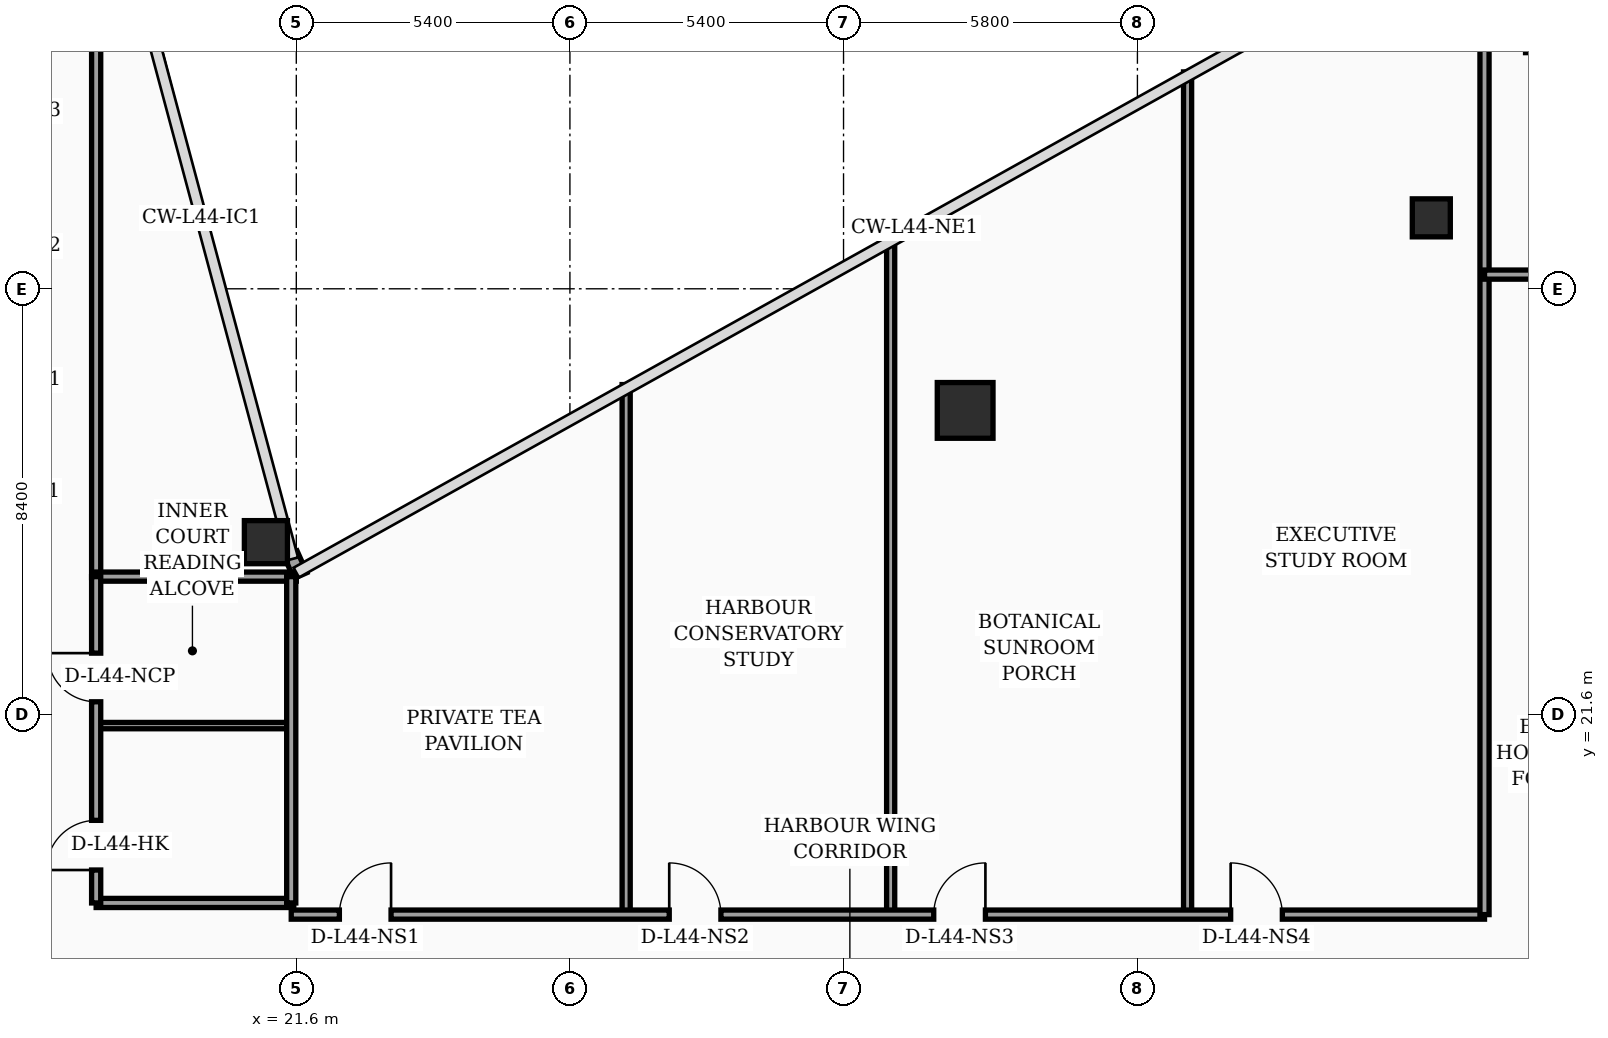
"""IFC4 building model, lengths in metres.
Left out: names, types, materials, properties, quantities, classifications, styles, units other than length and angle.
Written with IfcOpenShell. Run it as: python <this file> out.ifc"""

import sys

from ifc_helpers import new_model, si_unit, direction, frame, frame_2d, origin, origin_2d, place, context, subcontext, project, spatial, rectangle, hollow_rectangle, circle, extrude, element, fill, save


model = new_model("IFC4")
c1 = context("Model", 3, precision=1e-05, world=origin(), true_north=direction((0.0, 1.0)))
c2 = subcontext(c1, "Body", "Model", "MODEL_VIEW")
j1 = project(units=[si_unit("LENGTHUNIT", "METRE"), si_unit("PLANEANGLEUNIT", "RADIAN")], contexts=[c1])
p1 = place(None, origin())
s1 = spatial("IfcSite", under=j1, at=p1, CompositionType="ELEMENT")
p2 = place(p1, origin())
s2 = spatial("IfcBuilding", under=s1, at=p2, CompositionType="ELEMENT")
p3 = place(p2, frame((0.0, 0.0, 178.9)))
s3 = spatial("IfcBuildingStorey", under=s2, at=p3, CompositionType="ELEMENT", Elevation=178.9)
p4 = place(p3, frame((21.0, 25.0, 0.0), z_axis=(0.0, 0.0, 1.0), x_axis=(1.0, 0.0, 0.0)))
e1 = element("IfcColumn", 1, at=p4, inside=s3, PredefinedType="COLUMN", context=c2, shape_type="SweptSolid", body=[
    extrude(hollow_rectangle(XDim=0.85, YDim=0.85, WallThickness=0.036, at=origin_2d()), origin(), (0.0, 0.0, 1.0), 3.56),
])
p5 = place(p3, frame((34.8, 27.6, 0.0), z_axis=(0.0, 0.0, 1.0), x_axis=(1.0, 0.0, 0.0)))
e2 = element("IfcColumn", 2, at=p5, inside=s3, PredefinedType="COLUMN", context=c2, shape_type="SweptSolid", body=[
    extrude(circle(Radius=0.55, at=origin_2d()), origin(), (0.0, 0.0, 1.0), 3.56),
])
p6 = place(p3, frame((44.0, 31.4, 0.0), z_axis=(0.0, 0.0, 1.0), x_axis=(1.0, 0.0, 0.0)))
e3 = element("IfcColumn", 3, at=p6, inside=s3, PredefinedType="COLUMN", context=c2, shape_type="SweptSolid", body=[
    extrude(hollow_rectangle(XDim=0.75, YDim=0.75, WallThickness=0.032, at=origin_2d()), origin(), (0.0, 0.0, 1.0), 3.56),
])
p7 = place(p3, frame((21.68, 24.34, 0.0), z_axis=(0.0, 0.0, 1.0), x_axis=(-0.40758134973, 0.913168901875, 0.0)))
e4 = element("IfcWall", 4, at=p7, inside=s3, PredefinedType="SOLIDWALL", context=c2, shape_type="SweptSolid", body=[
    extrude(rectangle(XDim=0.471, YDim=0.28, at=frame_2d((0.235, 0.0))), origin(), (0.0, 0.0, 1.0), 3.56),
])
p8 = place(p3, frame((50.04, 34.8, 0.0), z_axis=(0.0, 0.0, 1.0), x_axis=(-1.0, 0.0, 0.0)))
e5 = element("IfcWall", 5, at=p8, inside=s3, PredefinedType="SOLIDWALL", context=c2, shape_type="SweptSolid", body=[
    extrude(rectangle(XDim=4.18, YDim=0.28, at=frame_2d((2.09, 0.0))), origin(), (0.0, 0.0, 1.0), 3.56),
])
p9 = place(p3, frame((17.65, 24.3, 0.0), z_axis=(0.0, 0.0, 1.0), x_axis=(0.0, 1.0, 0.0)))
e6 = element("IfcWall", 6, at=p9, inside=s3, PredefinedType="PARTITIONING", context=c2, shape_type="SweptSolid", body=[
    extrude(rectangle(XDim=17.65, YDim=0.18, at=frame_2d((8.825, 0.0))), origin(), (0.0, 0.0, 1.0), 2.94),
])
p10 = place(p3, frame((17.65, 17.88, 0.0), z_axis=(0.0, 0.0, 1.0), x_axis=(1.0, 0.0, 0.0)))
e7 = element("IfcWall", 7, at=p10, inside=s3, PredefinedType="PARTITIONING", context=c2, shape_type="SweptSolid", body=[
    extrude(rectangle(XDim=3.9, YDim=0.18, at=frame_2d((1.95, 0.0))), origin(), (0.0, 0.0, 1.0), 3.56),
])
p11 = place(p3, frame((17.65, 21.38, 0.0), z_axis=(0.0, 0.0, 1.0), x_axis=(1.0, 0.0, 0.0)))
e8 = element("IfcWall", 8, at=p11, inside=s3, PredefinedType="PARTITIONING", context=c2, shape_type="SweptSolid", body=[
    extrude(rectangle(XDim=3.9, YDim=0.125, at=frame_2d((1.95, 0.0))), origin(), (0.0, 0.0, 1.0), 3.09),
])
p12 = place(p3, frame((17.65, 24.32, 0.0), z_axis=(0.0, 0.0, 1.0), x_axis=(1.0, 0.0, 0.0)))
e9 = element("IfcWall", 9, at=p12, inside=s3, PredefinedType="PARTITIONING", context=c2, shape_type="SweptSolid", body=[
    extrude(rectangle(XDim=3.95, YDim=0.18, at=frame_2d((1.975, 0.0))), origin(), (0.0, 0.0, 1.0), 3.56),
])
p13 = place(p3, frame((21.5, 17.88, 0.0), z_axis=(0.0, 0.0, 1.0), x_axis=(0.0, 1.0, 0.0)))
e10 = element("IfcWall", 10, at=p13, inside=s3, PredefinedType="PARTITIONING", context=c2, shape_type="SweptSolid", body=[
    extrude(rectangle(XDim=6.44, YDim=0.18, at=frame_2d((3.22, 0.0))), origin(), (0.0, 0.0, 1.0), 3.09),
])
p14 = place(p3, frame((17.65, 17.88, 0.0), z_axis=(0.0, 0.0, 1.0), x_axis=(0.0, 1.0, 0.0)))
e11 = element("IfcWall", 11, at=p14, inside=s3, PredefinedType="PARTITIONING", context=c2, shape_type="SweptSolid", body=[
    extrude(rectangle(XDim=6.44, YDim=0.18, at=frame_2d((3.22, 0.0))), origin(), (0.0, 0.0, 1.0), 3.09),
])
p15 = place(p14, frame((0.65, 0.0, 0.0)))
e12 = element("IfcOpeningElement", 12, at=p15, cuts=e11, PredefinedType="OPENING", context=c2, shape_type="SweptSolid", body=[
    extrude(rectangle(XDim=0.98, YDim=2.15, at=frame_2d((0.49, 1.075))), frame((0.0, 0.1, 0.0), z_axis=(0.0, -1.0, 0.0), x_axis=(1.0, 0.0, 0.0)), (0.0, 0.0, 1.0), 0.2),
])
p16 = place(p14, frame((3.97, 0.0, 0.0)))
e13 = element("IfcOpeningElement", 13, at=p16, cuts=e11, PredefinedType="OPENING", context=c2, shape_type="SweptSolid", body=[
    extrude(rectangle(XDim=0.96, YDim=2.2, at=frame_2d((0.48, 1.1))), frame((0.0, 0.1, 0.0), z_axis=(0.0, -1.0, 0.0), x_axis=(1.0, 0.0, 0.0)), (0.0, 0.0, 1.0), 0.2),
])
p17 = place(p3, frame((28.11, 17.65, 0.0), z_axis=(0.0, 0.0, 1.0), x_axis=(0.0, 1.0, 0.0)))
e14 = element("IfcWall", 14, at=p17, inside=s3, PredefinedType="PARTITIONING", context=c2, shape_type="SweptSolid", body=[
    extrude(rectangle(XDim=10.46, YDim=0.16, at=frame_2d((5.23, 0.0))), origin(), (0.0, 0.0, 1.0), 2.94),
])
p18 = place(p3, frame((33.33, 17.65, 0.0), z_axis=(0.0, 0.0, 1.0), x_axis=(0.0, 1.0, 0.0)))
e15 = element("IfcWall", 15, at=p18, inside=s3, PredefinedType="PARTITIONING", context=c2, shape_type="SweptSolid", body=[
    extrude(rectangle(XDim=13.37, YDim=0.16, at=frame_2d((6.685, 0.0))), origin(), (0.0, 0.0, 1.0), 2.94),
])
p19 = place(p3, frame((39.19, 17.65, 0.0), z_axis=(0.0, 0.0, 1.0), x_axis=(0.0, 1.0, 0.0)))
e16 = element("IfcWall", 16, at=p19, inside=s3, PredefinedType="PARTITIONING", context=c2, shape_type="SweptSolid", body=[
    extrude(rectangle(XDim=16.63, YDim=0.16, at=frame_2d((8.315, 0.0))), origin(), (0.0, 0.0, 1.0), 2.94),
])
p20 = place(p3, frame((21.5, 17.65, 0.0), z_axis=(0.0, 0.0, 1.0), x_axis=(1.0, 0.0, 0.0)))
e17 = element("IfcWall", 17, at=p20, inside=s3, PredefinedType="PARTITIONING", context=c2, shape_type="SweptSolid", body=[
    extrude(rectangle(XDim=23.55, YDim=0.18, at=frame_2d((11.775, 0.0))), origin(), (0.0, 0.0, 1.0), 2.94),
])
p21 = place(p20, frame((0.95, 0.0, 0.0)))
e18 = element("IfcOpeningElement", 18, at=p21, cuts=e17, PredefinedType="OPENING", context=c2, shape_type="SweptSolid", body=[
    extrude(rectangle(XDim=1.02, YDim=2.2, at=frame_2d((0.51, 1.1))), frame((0.0, 0.1, 0.0), z_axis=(0.0, -1.0, 0.0), x_axis=(1.0, 0.0, 0.0)), (0.0, 0.0, 1.0), 0.2),
])
p22 = place(p20, frame((7.46, 0.0, 0.0)))
e19 = element("IfcOpeningElement", 19, at=p22, cuts=e17, PredefinedType="OPENING", context=c2, shape_type="SweptSolid", body=[
    extrude(rectangle(XDim=1.02, YDim=2.2, at=frame_2d((0.51, 1.1))), frame((0.0, 0.1, 0.0), z_axis=(0.0, -1.0, 0.0), x_axis=(1.0, 0.0, 0.0)), (0.0, 0.0, 1.0), 0.2),
])
p23 = place(p20, frame((12.68, 0.0, 0.0)))
e20 = element("IfcOpeningElement", 20, at=p23, cuts=e17, PredefinedType="OPENING", context=c2, shape_type="SweptSolid", body=[
    extrude(rectangle(XDim=1.02, YDim=2.2, at=frame_2d((0.51, 1.1))), frame((0.0, 0.1, 0.0), z_axis=(0.0, -1.0, 0.0), x_axis=(1.0, 0.0, 0.0)), (0.0, 0.0, 1.0), 0.2),
])
p24 = place(p20, frame((18.54, 0.0, 0.0)))
e21 = element("IfcOpeningElement", 21, at=p24, cuts=e17, PredefinedType="OPENING", context=c2, shape_type="SweptSolid", body=[
    extrude(rectangle(XDim=1.02, YDim=2.2, at=frame_2d((0.51, 1.1))), frame((0.0, 0.1, 0.0), z_axis=(0.0, -1.0, 0.0), x_axis=(1.0, 0.0, 0.0)), (0.0, 0.0, 1.0), 0.2),
])
p25 = place(p3, frame((45.05, 17.65, 0.0), z_axis=(0.0, 0.0, 1.0), x_axis=(0.0, 1.0, 0.0)))
e22 = element("IfcWall", 22, at=p25, inside=s3, PredefinedType="PARTITIONING", context=c2, shape_type="SweptSolid", body=[
    extrude(rectangle(XDim=19.9, YDim=0.18, at=frame_2d((9.95, 0.0))), origin(), (0.0, 0.0, 1.0), 2.94),
])
p26 = place(p3, frame((45.05, 30.28, 0.0), z_axis=(0.0, 0.0, 1.0), x_axis=(1.0, 0.0, 0.0)))
e23 = element("IfcWall", 23, at=p26, inside=s3, PredefinedType="PARTITIONING", context=c2, shape_type="SweptSolid", body=[
    extrude(rectangle(XDim=2.35, YDim=0.18, at=frame_2d((1.175, 0.0))), origin(), (0.0, 0.0, 1.0), 2.94),
])
p27 = place(p15, origin())
e24 = element("IfcDoor", 24, at=p27, inside=s3, OperationType="SINGLE_SWING_LEFT", PredefinedType="DOOR", context=c2, shape_type="SweptSolid", body=[
    extrude(rectangle(XDim=0.98, YDim=2.15, at=frame_2d((0.49, 1.075))), frame((0.0, 0.025, 0.0), z_axis=(0.0, -1.0, 0.0), x_axis=(1.0, 0.0, 0.0)), (0.0, 0.0, 1.0), 0.05),
])
fill(e12, e24)
p28 = place(p16, origin())
e25 = element("IfcDoor", 25, at=p28, inside=s3, OperationType="SINGLE_SWING_RIGHT", PredefinedType="DOOR", context=c2, shape_type="SweptSolid", body=[
    extrude(rectangle(XDim=0.96, YDim=2.2, at=frame_2d((0.48, 1.1))), frame((0.0, 0.025, 0.0), z_axis=(0.0, -1.0, 0.0), x_axis=(1.0, 0.0, 0.0)), (0.0, 0.0, 1.0), 0.05),
])
fill(e13, e25)
p29 = place(p21, origin())
e26 = element("IfcDoor", 26, at=p29, inside=s3, OperationType="SINGLE_SWING_RIGHT", PredefinedType="DOOR", context=c2, shape_type="SweptSolid", body=[
    extrude(rectangle(XDim=1.02, YDim=2.2, at=frame_2d((0.51, 1.1))), frame((0.0, 0.025, 0.0), z_axis=(0.0, -1.0, 0.0), x_axis=(1.0, 0.0, 0.0)), (0.0, 0.0, 1.0), 0.05),
])
fill(e18, e26)
p30 = place(p22, origin())
e27 = element("IfcDoor", 27, at=p30, inside=s3, OperationType="SINGLE_SWING_LEFT", PredefinedType="DOOR", context=c2, shape_type="SweptSolid", body=[
    extrude(rectangle(XDim=1.02, YDim=2.2, at=frame_2d((0.51, 1.1))), frame((0.0, 0.025, 0.0), z_axis=(0.0, -1.0, 0.0), x_axis=(1.0, 0.0, 0.0)), (0.0, 0.0, 1.0), 0.05),
])
fill(e19, e27)
p31 = place(p23, origin())
e28 = element("IfcDoor", 28, at=p31, inside=s3, OperationType="SINGLE_SWING_RIGHT", PredefinedType="DOOR", context=c2, shape_type="SweptSolid", body=[
    extrude(rectangle(XDim=1.02, YDim=2.2, at=frame_2d((0.51, 1.1))), frame((0.0, 0.025, 0.0), z_axis=(0.0, -1.0, 0.0), x_axis=(1.0, 0.0, 0.0)), (0.0, 0.0, 1.0), 0.05),
])
fill(e20, e28)
p32 = place(p24, origin())
e29 = element("IfcDoor", 29, at=p32, inside=s3, OperationType="SINGLE_SWING_LEFT", PredefinedType="DOOR", context=c2, shape_type="SweptSolid", body=[
    extrude(rectangle(XDim=1.02, YDim=2.2, at=frame_2d((0.51, 1.1))), frame((0.0, 0.025, 0.0), z_axis=(0.0, -1.0, 0.0), x_axis=(1.0, 0.0, 0.0)), (0.0, 0.0, 1.0), 0.05),
])
fill(e21, e29)
save(model, sys.argv[1])
